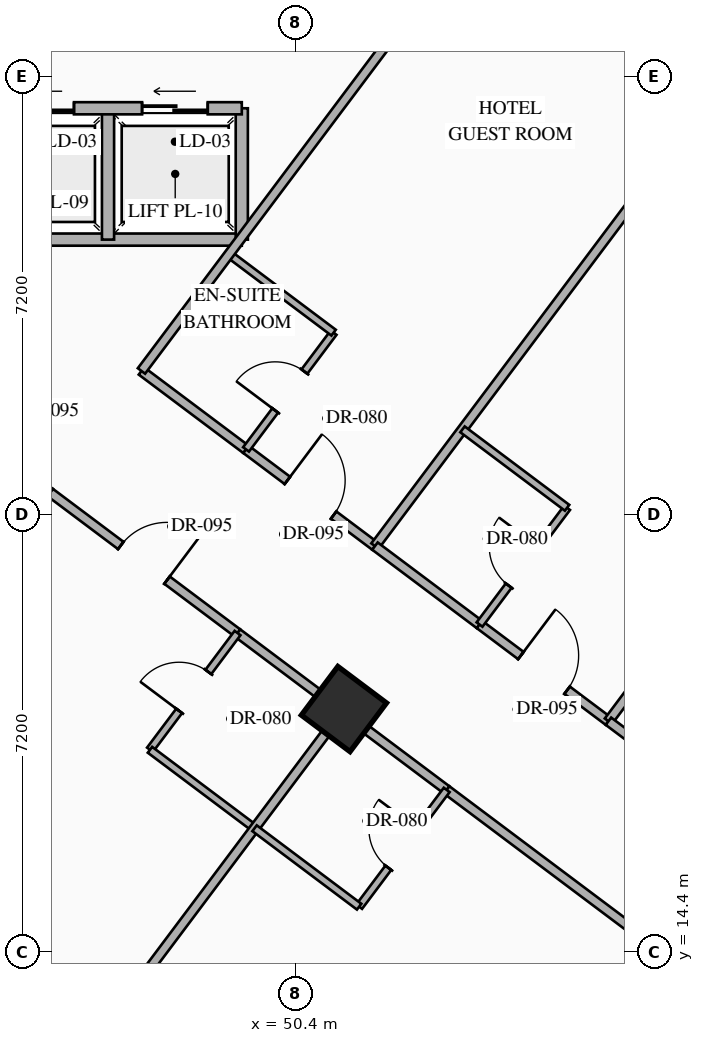
"""IFC4 building model, lengths in metres.
Left out: names, types, materials, properties, quantities, classifications, styles, units other than length and angle.
Written with IfcOpenShell. Run it as: python <this file> out.ifc"""

import sys

from ifc_helpers import new_model, si_unit, direction, frame, frame_2d, origin, origin_2d, place, context, subcontext, project, spatial, rectangle, hollow_rectangle, extrude, element, fill, save


model = new_model("IFC4")
c1 = context("Model", 3, precision=1e-05, world=origin(), true_north=direction((0.0, 1.0)))
c2 = subcontext(c1, "Body", "Model", "MODEL_VIEW")
j1 = project(units=[si_unit("LENGTHUNIT", "METRE"), si_unit("PLANEANGLEUNIT", "RADIAN")], contexts=[c1])
p1 = place(None, origin())
s1 = spatial("IfcSite", under=j1, at=p1, CompositionType="ELEMENT")
p2 = place(p1, origin())
s2 = spatial("IfcBuilding", under=s1, at=p2, CompositionType="ELEMENT")
p3 = place(p2, frame((0.0, 0.0, 56.7)))
s3 = spatial("IfcBuildingStorey", under=s2, at=p3, CompositionType="ELEMENT", Elevation=56.7)
p4 = place(p3, frame((51.2, 18.4, 0.0), z_axis=(0.0, 0.0, 1.0), x_axis=(0.799999996291, -0.600000004945, 0.0)))
e1 = element("IfcColumn", 1, at=p4, inside=s3, PredefinedType="COLUMN", context=c2, shape_type="SweptSolid", body=[
    extrude(hollow_rectangle(XDim=1.0, YDim=1.0, WallThickness=0.038, at=origin_2d()), origin(), (0.0, 0.0, 1.0), 3.35),
])
p5 = place(p3, frame((44.86, 40.73, 0.0), z_axis=(0.0, 0.0, 1.0), x_axis=(0.800006902154, -0.599990797017, 0.0)))
e2 = element("IfcWall", 2, at=p5, inside=s3, PredefinedType="STANDARD", context=c2, shape_type="SweptSolid", body=[
    extrude(rectangle(XDim=29.712, YDim=0.28, at=frame_2d((14.856, 0.0))), origin(), (0.0, 0.0, 1.0), 3.13),
])
p6 = place(p5, frame((14.249, 0.0, 0.0)))
e3 = element("IfcOpeningElement", 3, at=p6, cuts=e2, PredefinedType="OPENING", context=c2, shape_type="SweptSolid", body=[
    extrude(rectangle(XDim=1.1, YDim=2.2, at=frame_2d((0.55, 1.1))), frame((0.0, 0.15, 0.0), z_axis=(0.0, -1.0, 0.0), x_axis=(1.0, 0.0, 0.0)), (0.0, 0.0, 1.0), 0.3),
])
p7 = place(p5, frame((1.612, 0.0, 0.85)))
e4 = element("IfcOpeningElement", 4, at=p7, cuts=e2, PredefinedType="OPENING", context=c2, shape_type="SweptSolid", body=[
    extrude(rectangle(XDim=1.4, YDim=1.8, at=frame_2d((0.7, 0.9))), frame((0.0, 0.15, 0.0), z_axis=(0.0, -1.0, 0.0), x_axis=(1.0, 0.0, 0.0)), (0.0, 0.0, 1.0), 0.3),
])
p8 = place(p5, frame((5.667, 0.0, 0.85)))
e5 = element("IfcOpeningElement", 5, at=p8, cuts=e2, PredefinedType="OPENING", context=c2, shape_type="SweptSolid", body=[
    extrude(rectangle(XDim=1.4, YDim=1.8, at=frame_2d((0.7, 0.9))), frame((0.0, 0.15, 0.0), z_axis=(0.0, -1.0, 0.0), x_axis=(1.0, 0.0, 0.0)), (0.0, 0.0, 1.0), 0.3),
])
p9 = place(p5, frame((9.912, 0.0, 0.85)))
e6 = element("IfcOpeningElement", 6, at=p9, cuts=e2, PredefinedType="OPENING", context=c2, shape_type="SweptSolid", body=[
    extrude(rectangle(XDim=1.4, YDim=1.8, at=frame_2d((0.7, 0.9))), frame((0.0, 0.15, 0.0), z_axis=(0.0, -1.0, 0.0), x_axis=(1.0, 0.0, 0.0)), (0.0, 0.0, 1.0), 0.3),
])
p10 = place(p5, frame((19.528, 0.0, 0.85)))
e7 = element("IfcOpeningElement", 7, at=p10, cuts=e2, PredefinedType="OPENING", context=c2, shape_type="SweptSolid", body=[
    extrude(rectangle(XDim=1.4, YDim=1.8, at=frame_2d((0.7, 0.9))), frame((0.0, 0.15, 0.0), z_axis=(0.0, -1.0, 0.0), x_axis=(1.0, 0.0, 0.0)), (0.0, 0.0, 1.0), 0.3),
])
p11 = place(p5, frame((23.451, 0.0, 0.85)))
e8 = element("IfcOpeningElement", 8, at=p11, cuts=e2, PredefinedType="OPENING", context=c2, shape_type="SweptSolid", body=[
    extrude(rectangle(XDim=1.4, YDim=1.8, at=frame_2d((0.7, 0.9))), frame((0.0, 0.15, 0.0), z_axis=(0.0, -1.0, 0.0), x_axis=(1.0, 0.0, 0.0)), (0.0, 0.0, 1.0), 0.3),
])
p12 = place(p5, frame((27.852, 0.0, 0.85)))
e9 = element("IfcOpeningElement", 9, at=p12, cuts=e2, PredefinedType="OPENING", context=c2, shape_type="SweptSolid", body=[
    extrude(rectangle(XDim=1.4, YDim=1.8, at=frame_2d((0.7, 0.9))), frame((0.0, 0.15, 0.0), z_axis=(0.0, -1.0, 0.0), x_axis=(1.0, 0.0, 0.0)), (0.0, 0.0, 1.0), 0.3),
])
p13 = place(p3, frame((53.318, 2.487, 0.0), z_axis=(0.0, 0.0, 1.0), x_axis=(-0.800004174678, 0.599994433723, 0.0)))
e10 = element("IfcWall", 10, at=p13, inside=s3, PredefinedType="STANDARD", context=c2, shape_type="SweptSolid", body=[
    extrude(rectangle(XDim=35.089, YDim=0.28, at=frame_2d((17.544, 0.0))), origin(), (0.0, 0.0, 1.0), 3.13),
])
p14 = place(p13, frame((1.931, 0.0, 0.85)))
e11 = element("IfcOpeningElement", 11, at=p14, cuts=e10, PredefinedType="OPENING", context=c2, shape_type="SweptSolid", body=[
    extrude(rectangle(XDim=1.4, YDim=1.8, at=frame_2d((0.7, 0.9))), frame((0.0, 0.15, 0.0), z_axis=(0.0, -1.0, 0.0), x_axis=(1.0, 0.0, 0.0)), (0.0, 0.0, 1.0), 0.3),
])
p15 = place(p13, frame((6.819, 0.0, 0.85)))
e12 = element("IfcOpeningElement", 12, at=p15, cuts=e10, PredefinedType="OPENING", context=c2, shape_type="SweptSolid", body=[
    extrude(rectangle(XDim=1.4, YDim=1.8, at=frame_2d((0.7, 0.9))), frame((0.0, 0.15, 0.0), z_axis=(0.0, -1.0, 0.0), x_axis=(1.0, 0.0, 0.0)), (0.0, 0.0, 1.0), 0.3),
])
p16 = place(p13, frame((11.832, 0.0, 0.85)))
e13 = element("IfcOpeningElement", 13, at=p16, cuts=e10, PredefinedType="OPENING", context=c2, shape_type="SweptSolid", body=[
    extrude(rectangle(XDim=1.4, YDim=1.8, at=frame_2d((0.7, 0.9))), frame((0.0, 0.15, 0.0), z_axis=(0.0, -1.0, 0.0), x_axis=(1.0, 0.0, 0.0)), (0.0, 0.0, 1.0), 0.3),
])
p17 = place(p13, frame((17.647, 0.0, 0.85)))
e14 = element("IfcOpeningElement", 14, at=p17, cuts=e10, PredefinedType="OPENING", context=c2, shape_type="SweptSolid", body=[
    extrude(rectangle(XDim=1.4, YDim=1.8, at=frame_2d((0.7, 0.9))), frame((0.0, 0.15, 0.0), z_axis=(0.0, -1.0, 0.0), x_axis=(1.0, 0.0, 0.0)), (0.0, 0.0, 1.0), 0.3),
])
p18 = place(p13, frame((21.857, 0.0, 0.85)))
e15 = element("IfcOpeningElement", 15, at=p18, cuts=e10, PredefinedType="OPENING", context=c2, shape_type="SweptSolid", body=[
    extrude(rectangle(XDim=1.4, YDim=1.8, at=frame_2d((0.7, 0.9))), frame((0.0, 0.15, 0.0), z_axis=(0.0, -1.0, 0.0), x_axis=(1.0, 0.0, 0.0)), (0.0, 0.0, 1.0), 0.3),
])
p19 = place(p13, frame((26.87, 0.0, 0.85)))
e16 = element("IfcOpeningElement", 16, at=p19, cuts=e10, PredefinedType="OPENING", context=c2, shape_type="SweptSolid", body=[
    extrude(rectangle(XDim=1.4, YDim=1.8, at=frame_2d((0.7, 0.9))), frame((0.0, 0.15, 0.0), z_axis=(0.0, -1.0, 0.0), x_axis=(1.0, 0.0, 0.0)), (0.0, 0.0, 1.0), 0.3),
])
p20 = place(p13, frame((31.757, 0.0, 0.85)))
e17 = element("IfcOpeningElement", 17, at=p20, cuts=e10, PredefinedType="OPENING", context=c2, shape_type="SweptSolid", body=[
    extrude(rectangle(XDim=1.4, YDim=1.8, at=frame_2d((0.7, 0.9))), frame((0.0, 0.15, 0.0), z_axis=(0.0, -1.0, 0.0), x_axis=(1.0, 0.0, 0.0)), (0.0, 0.0, 1.0), 0.3),
])
p21 = place(p3, frame((45.12, 26.12, 0.0), z_axis=(0.0, 0.0, 1.0), x_axis=(1.0, 0.0, 0.0)))
e18 = element("IfcWall", 18, at=p21, inside=s3, PredefinedType="STANDARD", context=c2, shape_type="SweptSolid", body=[
    extrude(rectangle(XDim=4.4, YDim=0.2, at=frame_2d((2.2, 0.0))), origin(), (0.0, 0.0, 1.0), 3.13),
])
for number, where, z_axis, x_axis in (
    (19, (49.52, 26.12, 0.0), (0.0, 0.0, 1.0), (0.0, 1.0, 0.0)),
    (20, (47.32, 26.12, 0.0), (0.0, 0.0, 1.0), (0.0, 1.0, 0.0)),
):
    element("IfcWall", number, at=place(p3, frame(where, z_axis=z_axis, x_axis=x_axis)), inside=s3, PredefinedType="STANDARD", context=c2, shape_type="SweptSolid", body=[
        extrude(rectangle(XDim=2.16, YDim=0.2, at=frame_2d((1.08, 0.0))), origin(), (0.0, 0.0, 1.0), 3.13),
    ])
p22 = place(p3, frame((45.12, 28.28, 0.0), z_axis=(0.0, 0.0, 1.0), x_axis=(1.0, 0.0, 0.0)))
e21 = element("IfcWall", 21, at=p22, inside=s3, PredefinedType="STANDARD", context=c2, shape_type="SweptSolid", body=[
    extrude(rectangle(XDim=4.4, YDim=0.2, at=frame_2d((2.2, 0.0))), origin(), (0.0, 0.0, 1.0), 3.13),
])
p23 = place(p22, frame((0.56, 0.0, 0.0)))
e22 = element("IfcOpeningElement", 22, at=p23, cuts=e21, PredefinedType="OPENING", context=c2, shape_type="SweptSolid", body=[
    extrude(rectangle(XDim=1.08, YDim=2.15, at=frame_2d((0.54, 1.075))), frame((0.0, 0.11, 0.0), z_axis=(0.0, -1.0, 0.0), x_axis=(1.0, 0.0, 0.0)), (0.0, 0.0, 1.0), 0.22),
])
p24 = place(p22, frame((2.76, 0.0, 0.0)))
e23 = element("IfcOpeningElement", 23, at=p24, cuts=e21, PredefinedType="OPENING", context=c2, shape_type="SweptSolid", body=[
    extrude(rectangle(XDim=1.08, YDim=2.15, at=frame_2d((0.54, 1.075))), frame((0.0, 0.11, 0.0), z_axis=(0.0, -1.0, 0.0), x_axis=(1.0, 0.0, 0.0)), (0.0, 0.0, 1.0), 0.22),
])
p25 = place(p3, frame((43.037, 24.46, 0.0), z_axis=(0.0, 0.0, 1.0), x_axis=(0.799971872363, -0.600037501685, 0.0)))
e24 = element("IfcWall", 24, at=p25, inside=s3, PredefinedType="PARTITIONING", context=c2, shape_type="SweptSolid", body=[
    extrude(rectangle(XDim=4.167, YDim=0.15, at=frame_2d((2.083, 0.0))), origin(), (0.0, 0.0, 1.0), 2.425),
])
p26 = place(p25, frame((2.468, 0.0, 0.0)))
e25 = element("IfcOpeningElement", 25, at=p26, cuts=e24, PredefinedType="OPENING", context=c2, shape_type="SweptSolid", body=[
    extrude(rectangle(XDim=0.95, YDim=2.15, at=frame_2d((0.475, 1.075))), frame((0.0, 0.085, 0.0), z_axis=(0.0, -1.0, 0.0), x_axis=(1.0, 0.0, 0.0)), (0.0, 0.0, 1.0), 0.17),
])
p27 = place(p3, frame((39.464, 12.752, 0.0), z_axis=(0.0, 0.0, 1.0), x_axis=(0.6, 0.8, 0.0)))
e26 = element("IfcWall", 26, at=p27, inside=s3, PredefinedType="PARTITIONING", context=c2, shape_type="SweptSolid", body=[
    extrude(rectangle(XDim=11.51, YDim=0.15, at=frame_2d((5.755, 0.0))), origin(), (0.0, 0.0, 1.0), 3.13),
])
p28 = place(p3, frame((47.87, 23.96, 0.0), z_axis=(0.0, 0.0, 1.0), x_axis=(0.79998637334, -0.60001816845, 0.0)))
e27 = element("IfcWall", 27, at=p28, inside=s3, PredefinedType="PARTITIONING", context=c2, shape_type="SweptSolid", body=[
    extrude(rectangle(XDim=2.15, YDim=0.15, at=frame_2d((1.075, 0.0))), origin(), (0.0, 0.0, 1.0), 2.775),
])
p29 = place(p3, frame((49.59, 22.67, 0.0), z_axis=(0.0, 0.0, 1.0), x_axis=(0.800011056104, -0.599985258246, 0.0)))
e28 = element("IfcWall", 28, at=p29, inside=s3, PredefinedType="PARTITIONING", context=c2, shape_type="SweptSolid", body=[
    extrude(rectangle(XDim=2.65, YDim=0.15, at=frame_2d((1.325, 0.0))), origin(), (0.0, 0.0, 1.0), 2.775),
])
p30 = place(p29, frame((0.85, 0.0, 0.0)))
e29 = element("IfcOpeningElement", 29, at=p30, cuts=e28, PredefinedType="OPENING", context=c2, shape_type="SweptSolid", body=[
    extrude(rectangle(XDim=0.95, YDim=2.15, at=frame_2d((0.475, 1.075))), frame((0.0, 0.085, 0.0), z_axis=(0.0, -1.0, 0.0), x_axis=(1.0, 0.0, 0.0)), (0.0, 0.0, 1.0), 0.17),
])
p31 = place(p3, frame((49.59, 22.67, 0.0), z_axis=(0.0, 0.0, 1.0), x_axis=(0.599951172744, 0.800036618114, 0.0)))
e30 = element("IfcWall", 30, at=p31, inside=s3, PredefinedType="PARTITIONING", context=c2, shape_type="SweptSolid", body=[
    extrude(rectangle(XDim=2.4, YDim=0.12, at=frame_2d((1.2, 0.0))), origin(), (0.0, 0.0, 1.0), 3.13),
])
p32 = place(p31, frame((0.8, 0.0, 0.0)))
e31 = element("IfcOpeningElement", 31, at=p32, cuts=e30, PredefinedType="OPENING", context=c2, shape_type="SweptSolid", body=[
    extrude(rectangle(XDim=0.8, YDim=2.06, at=frame_2d((0.4, 1.03))), frame((0.0, 0.07, 0.0), z_axis=(0.0, -1.0, 0.0), x_axis=(1.0, 0.0, 0.0)), (0.0, 0.0, 1.0), 0.14),
])
p33 = place(p3, frame((49.31, 25.88, 0.0), z_axis=(0.0, 0.0, 1.0), x_axis=(0.800040880289, -0.59994548908, 0.0)))
e32 = element("IfcWall", 32, at=p33, inside=s3, PredefinedType="PARTITIONING", context=c2, shape_type="SweptSolid", body=[
    extrude(rectangle(XDim=2.15, YDim=0.12, at=frame_2d((1.075, 0.0))), origin(), (0.0, 0.0, 1.0), 3.13),
])
for number, where, z_axis, x_axis in (
    (33, (47.87, 23.96, 0.0), (0.0, 0.0, 1.0), (0.6, 0.8, 0.0)),
    (34, (51.71, 21.08, 0.0), (0.0, 0.0, 1.0), (0.6, 0.8, 0.0)),
):
    element("IfcWall", number, at=place(p3, frame(where, z_axis=z_axis, x_axis=x_axis)), inside=s3, PredefinedType="PARTITIONING", context=c2, shape_type="SweptSolid", body=[
        extrude(rectangle(XDim=11.55, YDim=0.15, at=frame_2d((5.775, 0.0))), origin(), (0.0, 0.0, 1.0), 3.13),
    ])
p34 = place(p3, frame((51.71, 21.08, 0.0), z_axis=(0.0, 0.0, 1.0), x_axis=(0.79998637334, -0.60001816845, 0.0)))
e35 = element("IfcWall", 35, at=p34, inside=s3, PredefinedType="PARTITIONING", context=c2, shape_type="SweptSolid", body=[
    extrude(rectangle(XDim=2.15, YDim=0.15, at=frame_2d((1.075, 0.0))), origin(), (0.0, 0.0, 1.0), 2.775),
])
p35 = place(p3, frame((53.43, 19.79, 0.0), z_axis=(0.0, 0.0, 1.0), x_axis=(0.8, -0.6, 0.0)))
e36 = element("IfcWall", 36, at=p35, inside=s3, PredefinedType="PARTITIONING", context=c2, shape_type="SweptSolid", body=[
    extrude(rectangle(XDim=2.65, YDim=0.15, at=frame_2d((1.325, 0.0))), origin(), (0.0, 0.0, 1.0), 2.775),
])
p36 = place(p35, frame((0.85, 0.0, 0.0)))
e37 = element("IfcOpeningElement", 37, at=p36, cuts=e36, PredefinedType="OPENING", context=c2, shape_type="SweptSolid", body=[
    extrude(rectangle(XDim=0.95, YDim=2.15, at=frame_2d((0.475, 1.075))), frame((0.0, 0.085, 0.0), z_axis=(0.0, -1.0, 0.0), x_axis=(1.0, 0.0, 0.0)), (0.0, 0.0, 1.0), 0.17),
])
p37 = place(p3, frame((53.43, 19.79, 0.0), z_axis=(0.0, 0.0, 1.0), x_axis=(0.600065100855, 0.79995117022, 0.0)))
e38 = element("IfcWall", 38, at=p37, inside=s3, PredefinedType="PARTITIONING", context=c2, shape_type="SweptSolid", body=[
    extrude(rectangle(XDim=2.4, YDim=0.12, at=frame_2d((1.2, 0.0))), origin(), (0.0, 0.0, 1.0), 3.13),
])
p38 = place(p37, frame((0.8, 0.0, 0.0)))
e39 = element("IfcOpeningElement", 39, at=p38, cuts=e38, PredefinedType="OPENING", context=c2, shape_type="SweptSolid", body=[
    extrude(rectangle(XDim=0.8, YDim=2.06, at=frame_2d((0.4, 1.03))), frame((0.0, 0.07, 0.0), z_axis=(0.0, -1.0, 0.0), x_axis=(1.0, 0.0, 0.0)), (0.0, 0.0, 1.0), 0.14),
])
p39 = place(p3, frame((53.15, 23.0, 0.0), z_axis=(0.0, 0.0, 1.0), x_axis=(0.800027249606, -0.599963665473, 0.0)))
e40 = element("IfcWall", 40, at=p39, inside=s3, PredefinedType="PARTITIONING", context=c2, shape_type="SweptSolid", body=[
    extrude(rectangle(XDim=2.15, YDim=0.12, at=frame_2d((1.075, 0.0))), origin(), (0.0, 0.0, 1.0), 3.13),
])
p40 = place(p3, frame((55.55, 18.2, 0.0), z_axis=(0.0, 0.0, 1.0), x_axis=(0.599996617946, 0.80000253653, 0.0)))
e41 = element("IfcWall", 41, at=p40, inside=s3, PredefinedType="PARTITIONING", context=c2, shape_type="SweptSolid", body=[
    extrude(rectangle(XDim=11.55, YDim=0.15, at=frame_2d((5.775, 0.0))), origin(), (0.0, 0.0, 1.0), 3.13),
])
p41 = place(p3, frame((55.55, 18.2, 0.0), z_axis=(0.0, 0.0, 1.0), x_axis=(0.79998637334, -0.60001816845, 0.0)))
e42 = element("IfcWall", 42, at=p41, inside=s3, PredefinedType="PARTITIONING", context=c2, shape_type="SweptSolid", body=[
    extrude(rectangle(XDim=2.15, YDim=0.15, at=frame_2d((1.075, 0.0))), origin(), (0.0, 0.0, 1.0), 2.775),
])
p42 = place(p3, frame((46.37, 21.96, 0.0), z_axis=(0.0, 0.0, 1.0), x_axis=(0.799977170108, -0.600030438649, 0.0)))
e43 = element("IfcWall", 43, at=p42, inside=s3, PredefinedType="PARTITIONING", context=c2, shape_type="SweptSolid", body=[
    extrude(rectangle(XDim=3.85, YDim=0.15, at=frame_2d((1.925, 0.0))), origin(), (0.0, 0.0, 1.0), 2.425),
])
p43 = place(p42, frame((1.45, 0.0, 0.0)))
e44 = element("IfcOpeningElement", 44, at=p43, cuts=e43, PredefinedType="OPENING", context=c2, shape_type="SweptSolid", body=[
    extrude(rectangle(XDim=0.95, YDim=2.15, at=frame_2d((0.475, 1.075))), frame((0.0, 0.085, 0.0), z_axis=(0.0, -1.0, 0.0), x_axis=(1.0, 0.0, 0.0)), (0.0, 0.0, 1.0), 0.17),
])
p44 = place(p3, frame((49.45, 19.65, 0.0), z_axis=(0.0, 0.0, 1.0), x_axis=(0.800040880289, -0.59994548908, 0.0)))
e45 = element("IfcWall", 45, at=p44, inside=s3, PredefinedType="PARTITIONING", context=c2, shape_type="SweptSolid", body=[
    extrude(rectangle(XDim=2.15, YDim=0.15, at=frame_2d((1.075, 0.0))), origin(), (0.0, 0.0, 1.0), 2.425),
])
p45 = place(p3, frame((48.01, 17.73, 0.0), z_axis=(0.0, 0.0, 1.0), x_axis=(0.6, 0.8, 0.0)))
e46 = element("IfcWall", 46, at=p45, inside=s3, PredefinedType="PARTITIONING", context=c2, shape_type="SweptSolid", body=[
    extrude(rectangle(XDim=2.4, YDim=0.12, at=frame_2d((1.2, 0.0))), origin(), (0.0, 0.0, 1.0), 3.13),
])
p46 = place(p45, frame((0.8, 0.0, 0.0)))
e47 = element("IfcOpeningElement", 47, at=p46, cuts=e46, PredefinedType="OPENING", context=c2, shape_type="SweptSolid", body=[
    extrude(rectangle(XDim=0.8, YDim=2.06, at=frame_2d((0.4, 1.03))), frame((0.0, 0.07, 0.0), z_axis=(0.0, -1.0, 0.0), x_axis=(1.0, 0.0, 0.0)), (0.0, 0.0, 1.0), 0.14),
])
p47 = place(p3, frame((48.01, 17.73, 0.0), z_axis=(0.0, 0.0, 1.0), x_axis=(0.79998637334, -0.60001816845, 0.0)))
e48 = element("IfcWall", 48, at=p47, inside=s3, PredefinedType="PARTITIONING", context=c2, shape_type="SweptSolid", body=[
    extrude(rectangle(XDim=2.15, YDim=0.12, at=frame_2d((1.075, 0.0))), origin(), (0.0, 0.0, 1.0), 3.13),
])
p48 = place(p3, frame((44.36, 9.28, 0.0), z_axis=(0.0, 0.0, 1.0), x_axis=(0.599986233332, 0.800010324816, 0.0)))
e49 = element("IfcWall", 49, at=p48, inside=s3, PredefinedType="PARTITIONING", context=c2, shape_type="SweptSolid", body=[
    extrude(rectangle(XDim=11.35, YDim=0.15, at=frame_2d((5.675, 0.0))), origin(), (0.0, 0.0, 1.0), 2.425),
])
p49 = place(p3, frame((51.17, 18.36, 0.0), z_axis=(0.0, 0.0, 1.0), x_axis=(0.79998637334, -0.60001816845, 0.0)))
e50 = element("IfcWall", 50, at=p49, inside=s3, PredefinedType="PARTITIONING", context=c2, shape_type="SweptSolid", body=[
    extrude(rectangle(XDim=2.15, YDim=0.15, at=frame_2d((1.075, 0.0))), origin(), (0.0, 0.0, 1.0), 2.425),
])
p50 = place(p3, frame((52.89, 17.07, 0.0), z_axis=(0.0, 0.0, 1.0), x_axis=(0.8, -0.6, 0.0)))
e51 = element("IfcWall", 51, at=p50, inside=s3, PredefinedType="PARTITIONING", context=c2, shape_type="SweptSolid", body=[
    extrude(rectangle(XDim=11.51, YDim=0.15, at=frame_2d((5.755, 0.0))), origin(), (0.0, 0.0, 1.0), 2.425),
])
p51 = place(p50, frame((5.28, 0.0, 0.0)))
e52 = element("IfcOpeningElement", 52, at=p51, cuts=e51, PredefinedType="OPENING", context=c2, shape_type="SweptSolid", body=[
    extrude(rectangle(XDim=0.95, YDim=2.15, at=frame_2d((0.475, 1.075))), frame((0.0, 0.085, 0.0), z_axis=(0.0, -1.0, 0.0), x_axis=(1.0, 0.0, 0.0)), (0.0, 0.0, 1.0), 0.17),
])
p52 = place(p3, frame((51.45, 15.15, 0.0), z_axis=(0.0, 0.0, 1.0), x_axis=(0.599951172744, 0.800036618114, 0.0)))
e53 = element("IfcWall", 53, at=p52, inside=s3, PredefinedType="PARTITIONING", context=c2, shape_type="SweptSolid", body=[
    extrude(rectangle(XDim=2.4, YDim=0.12, at=frame_2d((1.2, 0.0))), origin(), (0.0, 0.0, 1.0), 3.13),
])
p53 = place(p52, frame((0.8, 0.0, 0.0)))
e54 = element("IfcOpeningElement", 54, at=p53, cuts=e53, PredefinedType="OPENING", context=c2, shape_type="SweptSolid", body=[
    extrude(rectangle(XDim=0.8, YDim=2.06, at=frame_2d((0.4, 1.03))), frame((0.0, 0.07, 0.0), z_axis=(0.0, -1.0, 0.0), x_axis=(1.0, 0.0, 0.0)), (0.0, 0.0, 1.0), 0.14),
])
p54 = place(p3, frame((49.73, 16.44, 0.0), z_axis=(0.0, 0.0, 1.0), x_axis=(0.79998637334, -0.60001816845, 0.0)))
e55 = element("IfcWall", 55, at=p54, inside=s3, PredefinedType="PARTITIONING", context=c2, shape_type="SweptSolid", body=[
    extrude(rectangle(XDim=2.15, YDim=0.12, at=frame_2d((1.075, 0.0))), origin(), (0.0, 0.0, 1.0), 3.13),
])
p55 = place(p23, origin())
e56 = element("IfcDoor", 56, at=p55, inside=s3, OperationType="SLIDING_TO_LEFT", PredefinedType="USERDEFINED", context=c2, shape_type="SweptSolid", body=[
    extrude(rectangle(XDim=1.08, YDim=2.15, at=frame_2d((0.54, 1.075))), frame((0.0, 0.025, 0.0), z_axis=(0.0, -1.0, 0.0), x_axis=(1.0, 0.0, 0.0)), (0.0, 0.0, 1.0), 0.05),
])
fill(e22, e56)
p56 = place(p24, origin())
e57 = element("IfcDoor", 57, at=p56, inside=s3, OperationType="SLIDING_TO_LEFT", PredefinedType="USERDEFINED", context=c2, shape_type="SweptSolid", body=[
    extrude(rectangle(XDim=1.08, YDim=2.15, at=frame_2d((0.54, 1.075))), frame((0.0, 0.025, 0.0), z_axis=(0.0, -1.0, 0.0), x_axis=(1.0, 0.0, 0.0)), (0.0, 0.0, 1.0), 0.05),
])
fill(e23, e57)
p57 = place(p30, origin())
e58 = element("IfcDoor", 58, at=p57, inside=s3, OperationType="SINGLE_SWING_LEFT", PredefinedType="DOOR", context=c2, shape_type="SweptSolid", body=[
    extrude(rectangle(XDim=0.95, YDim=2.15, at=frame_2d((0.475, 1.075))), frame((0.0, 0.025, 0.0), z_axis=(0.0, -1.0, 0.0), x_axis=(1.0, 0.0, 0.0)), (0.0, 0.0, 1.0), 0.05),
])
fill(e29, e58)
p58 = place(p32, origin())
e59 = element("IfcDoor", 59, at=p58, inside=s3, OperationType="SINGLE_SWING_LEFT", PredefinedType="DOOR", context=c2, shape_type="SweptSolid", body=[
    extrude(rectangle(XDim=0.8, YDim=2.06, at=frame_2d((0.4, 1.03))), frame((0.0, 0.025, 0.0), z_axis=(0.0, -1.0, 0.0), x_axis=(1.0, 0.0, 0.0)), (0.0, 0.0, 1.0), 0.05),
])
fill(e31, e59)
p59 = place(p36, origin())
e60 = element("IfcDoor", 60, at=p59, inside=s3, OperationType="SINGLE_SWING_LEFT", PredefinedType="DOOR", context=c2, shape_type="SweptSolid", body=[
    extrude(rectangle(XDim=0.95, YDim=2.15, at=frame_2d((0.475, 1.075))), frame((0.0, 0.025, 0.0), z_axis=(0.0, -1.0, 0.0), x_axis=(1.0, 0.0, 0.0)), (0.0, 0.0, 1.0), 0.05),
])
fill(e37, e60)
p60 = place(p38, origin())
e61 = element("IfcDoor", 61, at=p60, inside=s3, OperationType="SINGLE_SWING_RIGHT", PredefinedType="DOOR", context=c2, shape_type="SweptSolid", body=[
    extrude(rectangle(XDim=0.8, YDim=2.06, at=frame_2d((0.4, 1.03))), frame((0.0, 0.025, 0.0), z_axis=(0.0, -1.0, 0.0), x_axis=(1.0, 0.0, 0.0)), (0.0, 0.0, 1.0), 0.05),
])
fill(e39, e61)
p61 = place(p43, origin())
e62 = element("IfcDoor", 62, at=p61, inside=s3, OperationType="SINGLE_SWING_RIGHT", PredefinedType="DOOR", context=c2, shape_type="SweptSolid", body=[
    extrude(rectangle(XDim=0.95, YDim=2.15, at=frame_2d((0.475, 1.075))), frame((0.0, 0.025, 0.0), z_axis=(0.0, -1.0, 0.0), x_axis=(1.0, 0.0, 0.0)), (0.0, 0.0, 1.0), 0.05),
])
fill(e44, e62)
p62 = place(p46, origin())
e63 = element("IfcDoor", 63, at=p62, inside=s3, OperationType="SINGLE_SWING_LEFT", PredefinedType="DOOR", context=c2, shape_type="SweptSolid", body=[
    extrude(rectangle(XDim=0.8, YDim=2.06, at=frame_2d((0.4, 1.03))), frame((0.0, 0.025, 0.0), z_axis=(0.0, -1.0, 0.0), x_axis=(1.0, 0.0, 0.0)), (0.0, 0.0, 1.0), 0.05),
])
fill(e47, e63)
p63 = place(p53, origin())
e64 = element("IfcDoor", 64, at=p63, inside=s3, OperationType="SINGLE_SWING_RIGHT", PredefinedType="DOOR", context=c2, shape_type="SweptSolid", body=[
    extrude(rectangle(XDim=0.8, YDim=2.06, at=frame_2d((0.4, 1.03))), frame((0.0, 0.025, 0.0), z_axis=(0.0, -1.0, 0.0), x_axis=(1.0, 0.0, 0.0)), (0.0, 0.0, 1.0), 0.05),
])
fill(e54, e64)
save(model, sys.argv[1])
